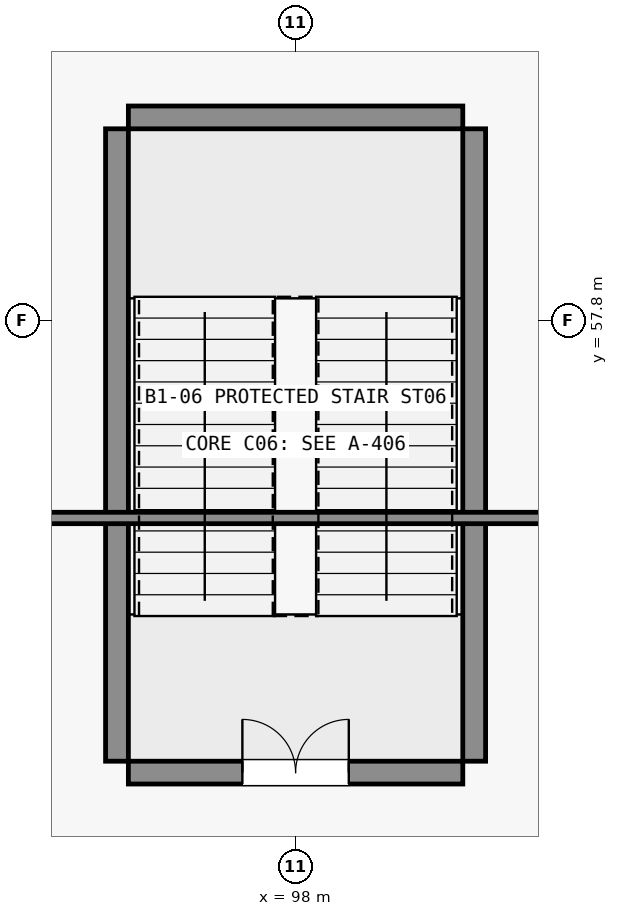
"""IFC4 building model, lengths in metres.
Left out: names, types, materials, properties, quantities, classifications, styles, units other than length and angle.
Written with IfcOpenShell. Run it as: python <this file> out.ifc"""

import sys

from ifc_helpers import new_model, si_unit, direction, frame, frame_2d, origin, place, context, subcontext, project, spatial, rectangle, extrude, element, fill, save


model = new_model("IFC4")
c1 = context("Model", 3, precision=1e-05, world=origin(), true_north=direction((0.0, 1.0)))
c2 = subcontext(c1, "Body", "Model", "MODEL_VIEW")
j1 = project(units=[si_unit("LENGTHUNIT", "METRE"), si_unit("PLANEANGLEUNIT", "RADIAN")], contexts=[c1])
p1 = place(None, origin())
s1 = spatial("IfcSite", under=j1, at=p1, CompositionType="ELEMENT")
p2 = place(p1, origin())
s2 = spatial("IfcBuilding", under=s1, at=p2, CompositionType="ELEMENT")
p3 = place(p2, frame((0.0, 0.0, -5.4)))
s3 = spatial("IfcBuildingStorey", under=s2, at=p3, CompositionType="ELEMENT", Elevation=-5.4)
p4 = place(p3, frame((95.8, 51.85, 0.0), z_axis=(0.0, 0.0, 1.0), x_axis=(1.0, 0.0, 0.0)))
e1 = element("IfcWall", 1, at=p4, inside=s3, PredefinedType="SHEAR", context=c2, shape_type="SweptSolid", body=[
    extrude(rectangle(XDim=4.4, YDim=0.3, at=frame_2d((2.2, 0.0))), origin(), (0.0, 0.0, 1.0), 5.4),
])
p5 = place(p4, frame((1.5, 0.0, 0.0)))
e2 = element("IfcOpeningElement", 2, at=p5, cuts=e1, PredefinedType="OPENING", context=c2, shape_type="SweptSolid", body=[
    extrude(rectangle(XDim=1.4, YDim=2.2, at=frame_2d((0.7, 1.1))), frame((0.0, 0.16, 0.0), z_axis=(0.0, -1.0, 0.0), x_axis=(1.0, 0.0, 0.0)), (0.0, 0.0, 1.0), 0.32),
])
p6 = place(p3, frame((95.8, 60.47, 0.0), z_axis=(0.0, 0.0, 1.0), x_axis=(1.0, 0.0, 0.0)))
e3 = element("IfcWall", 3, at=p6, inside=s3, PredefinedType="SHEAR", context=c2, shape_type="SweptSolid", body=[
    extrude(rectangle(XDim=4.4, YDim=0.3, at=frame_2d((2.2, 0.0))), origin(), (0.0, 0.0, 1.0), 5.4),
])
for number, where, z_axis, x_axis in (
    (4, (95.65, 52.0, 0.0), (0.0, 0.0, 1.0), (0.0, 1.0, 0.0)),
    (5, (100.35, 52.0, 0.0), (0.0, 0.0, 1.0), (0.0, 1.0, 0.0)),
):
    element("IfcWall", number, at=place(p3, frame(where, z_axis=z_axis, x_axis=x_axis)), inside=s3, PredefinedType="SHEAR", context=c2, shape_type="SweptSolid", body=[
        extrude(rectangle(XDim=8.32, YDim=0.3, at=frame_2d((4.16, 0.0))), origin(), (0.0, 0.0, 1.0), 5.4),
    ])
p7 = place(p3, frame((85.0, 55.2, 0.0), z_axis=(0.0, 0.0, 1.0), x_axis=(1.0, 0.0, 0.0)))
e6 = element("IfcWall", 6, at=p7, inside=s3, PredefinedType="STANDARD", context=c2, shape_type="SweptSolid", body=[
    extrude(rectangle(XDim=17.0, YDim=0.15, at=frame_2d((8.5, 0.0))), origin(), (0.0, 0.0, 1.0), 4.11),
])
p8 = place(p5, origin())
e7 = element("IfcDoor", 7, at=p8, inside=s3, OperationType="DOUBLE_DOOR_SINGLE_SWING", PredefinedType="DOOR", context=c2, shape_type="SweptSolid", body=[
    extrude(rectangle(XDim=1.4, YDim=2.2, at=frame_2d((0.7, 1.1))), frame((0.0, 0.025, 0.0), z_axis=(0.0, -1.0, 0.0), x_axis=(1.0, 0.0, 0.0)), (0.0, 0.0, 1.0), 0.05),
])
fill(e2, e7)
save(model, sys.argv[1])
